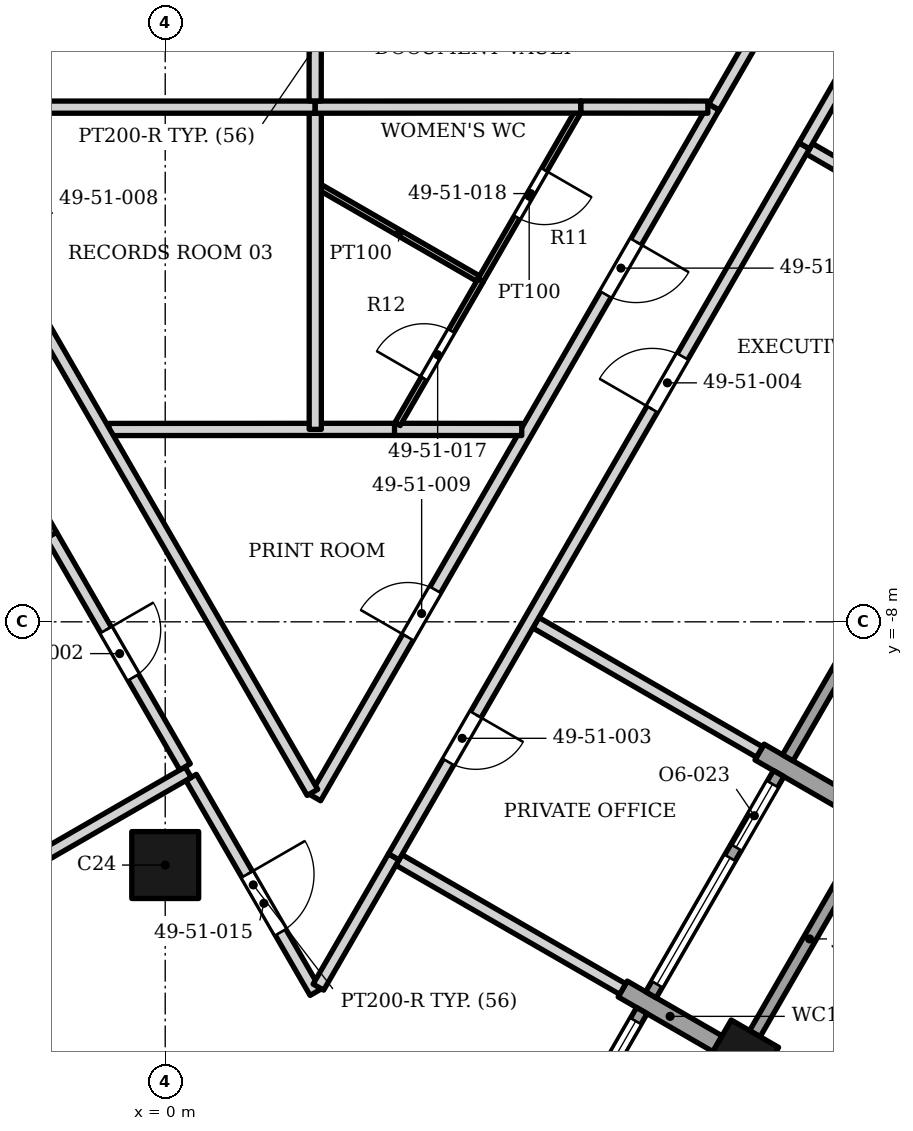
"""IFC4 building model, lengths in metres.
Left out: names, types, materials, properties, quantities, classifications, styles, units other than length and angle.
Written with IfcOpenShell. Run it as: python <this file> out.ifc"""

import sys

from ifc_helpers import new_model, si_unit, direction, frame, frame_2d, origin, origin_2d, place, context, subcontext, project, spatial, rectangle, extrude, element, fill, save


model = new_model("IFC4")
c1 = context("Model", 3, precision=1e-05, world=origin(), true_north=direction((0.0, 1.0)))
c2 = subcontext(c1, "Body", "Model", "MODEL_VIEW")
j1 = project(units=[si_unit("LENGTHUNIT", "METRE"), si_unit("PLANEANGLEUNIT", "RADIAN")], contexts=[c1])
p1 = place(None, origin())
s1 = spatial("IfcSite", under=j1, at=p1, CompositionType="ELEMENT")
p2 = place(p1, origin())
s2 = spatial("IfcBuilding", under=s1, at=p2, CompositionType="ELEMENT")
p3 = place(p2, frame((0.0, 0.0, 208.1)))
s3 = spatial("IfcBuildingStorey", under=s2, at=p3, CompositionType="ELEMENT", Elevation=208.1)
p4 = place(p3, frame((0.0, -12.0, 0.0), z_axis=(0.0, 0.0, 1.0), x_axis=(1.0, 0.0, 0.0)))
e1 = element("IfcColumn", 1, at=p4, inside=s3, PredefinedType="COLUMN", context=c2, shape_type="SweptSolid", body=[
    extrude(rectangle(XDim=1.1, YDim=1.1, at=origin_2d()), origin(), (0.0, 0.0, 1.0), 3.9),
])
p5 = place(p3, frame((9.473, -15.163, 0.0), z_axis=(0.0, 0.0, 1.0), x_axis=(0.5, 0.866025403784, 0.0)))
e2 = element("IfcColumn", 2, at=p5, inside=s3, PredefinedType="COLUMN", context=c2, shape_type="SweptSolid", body=[
    extrude(rectangle(XDim=0.9, YDim=0.9, at=origin_2d()), origin(), (0.0, 0.0, 1.0), 3.9),
])
for number, where, z_axis, x_axis in (
    (3, (9.083, -14.938, 0.0), (0.0, 0.0, 1.0), (-0.866, 0.5, 0.0)),
    (4, (11.333, -11.041, 0.0), (0.0, 0.0, 1.0), (-0.866, 0.5, 0.0)),
):
    element("IfcWall", number, at=place(p3, frame(where, z_axis=z_axis, x_axis=x_axis)), inside=s3, PredefinedType="SOLIDWALL", context=c2, shape_type="SweptSolid", body=[
        extrude(rectangle(XDim=1.8, YDim=0.3, at=frame_2d((0.9, 0.0))), origin(), (0.0, 0.0, 1.0), 3.0),
    ])
p6 = place(p3, frame((5.739, -18.031, 0.0), z_axis=(0.0, 0.0, 1.0), x_axis=(0.500002543286, 0.866023935413, 0.0)))
e5 = element("IfcWall", 5, at=p6, inside=s3, PredefinedType="ELEMENTEDWALL", context=c2, shape_type="SweptSolid", body=[
    extrude(rectangle(XDim=4.2, YDim=0.2, at=frame_2d((2.1, 0.0))), origin(), (0.0, 0.0, 1.0), 3.0),
])
p7 = place(p6, frame((0.2, 0.0, 0.45)))
e6 = element("IfcOpeningElement", 6, at=p7, cuts=e5, PredefinedType="OPENING", context=c2, shape_type="SweptSolid", body=[
    extrude(rectangle(XDim=3.8, YDim=2.25, at=frame_2d((1.9, 1.125))), frame((0.0, 0.11, 0.0), z_axis=(0.0, -1.0, 0.0), x_axis=(1.0, 0.0, 0.0)), (0.0, 0.0, 1.0), 0.22),
])
p8 = place(p3, frame((9.698, -14.773, 0.0), z_axis=(0.0, 0.0, 1.0), x_axis=(0.500012057535, 0.866018442252, 0.0)))
e7 = element("IfcWall", 7, at=p8, inside=s3, PredefinedType="SOLIDWALL", context=c2, shape_type="SweptSolid", body=[
    extrude(rectangle(XDim=3.6, YDim=0.2, at=frame_2d((1.8, 0.0))), origin(), (0.0, 0.0, 1.0), 2.95),
])
p9 = place(p3, frame((7.989, -14.133, 0.0), z_axis=(0.0, 0.0, 1.0), x_axis=(0.500027713859, 0.866009402589, 0.0)))
e8 = element("IfcWall", 8, at=p9, inside=s3, PredefinedType="ELEMENTEDWALL", context=c2, shape_type="SweptSolid", body=[
    extrude(rectangle(XDim=4.2, YDim=0.2, at=frame_2d((2.1, 0.0))), origin(), (0.0, 0.0, 1.0), 2.95),
])
p10 = place(p9, frame((0.2, 0.0, 0.45)))
e9 = element("IfcOpeningElement", 9, at=p10, cuts=e8, PredefinedType="OPENING", context=c2, shape_type="SweptSolid", body=[
    extrude(rectangle(XDim=2.4, YDim=2.25, at=frame_2d((1.2, 1.125))), frame((0.0, 0.11, 0.0), z_axis=(0.0, -1.0, 0.0), x_axis=(1.0, 0.0, 0.0)), (0.0, 0.0, 1.0), 0.22),
])
p11 = place(p9, frame((2.8, 0.0, 0.0)))
e10 = element("IfcOpeningElement", 10, at=p11, cuts=e8, PredefinedType="OPENING", context=c2, shape_type="SweptSolid", body=[
    extrude(rectangle(XDim=1.2, YDim=2.7, at=frame_2d((0.6, 1.35))), frame((0.0, 0.11, 0.0), z_axis=(0.0, -1.0, 0.0), x_axis=(1.0, 0.0, 0.0)), (0.0, 0.0, 1.0), 0.22),
])
p12 = place(p3, frame((10.239, -10.236, 0.0), z_axis=(0.0, 0.0, 1.0), x_axis=(0.500002543286, 0.866023935413, 0.0)))
e11 = element("IfcWall", 11, at=p12, inside=s3, PredefinedType="ELEMENTEDWALL", context=c2, shape_type="SweptSolid", body=[
    extrude(rectangle(XDim=4.2, YDim=0.2, at=frame_2d((2.1, 0.0))), origin(), (0.0, 0.0, 1.0), 3.0),
])
p13 = place(p3, frame((0.426, -10.558, 0.0), z_axis=(0.0, 0.0, 1.0), x_axis=(0.500350308999, -0.865823058301, 0.0)))
e12 = element("IfcWall", 12, at=p13, inside=s3, PredefinedType="PARTITIONING", context=c2, shape_type="SweptSolid", body=[
    extrude(rectangle(XDim=4.083, YDim=0.2, at=frame_2d((2.042, 0.0))), origin(), (0.0, 0.0, 1.0), 2.95),
])
p14 = place(p13, frame((1.842, 0.0, 0.0)))
e13 = element("IfcOpeningElement", 13, at=p14, cuts=e12, PredefinedType="OPENING", context=c2, shape_type="SweptSolid", body=[
    extrude(rectangle(XDim=1.1, YDim=2.1, at=frame_2d((0.55, 1.05))), frame((0.0, 0.11, 0.0), z_axis=(0.0, -1.0, 0.0), x_axis=(1.0, 0.0, 0.0)), (0.0, 0.0, 1.0), 0.22),
])
p15 = place(p3, frame((3.843, -11.915, 0.0), z_axis=(0.0, 0.0, 1.0), x_axis=(0.866177933903, -0.499735716973, 0.0)))
e14 = element("IfcWall", 14, at=p15, inside=s3, PredefinedType="PARTITIONING", context=c2, shape_type="SweptSolid", body=[
    extrude(rectangle(XDim=4.249, YDim=0.2, at=frame_2d((2.125, 0.0))), origin(), (0.0, 0.0, 1.0), 2.95),
])
p16 = place(p3, frame((2.519, -14.007, 0.0), z_axis=(0.0, 0.0, 1.0), x_axis=(0.500678517204, 0.865633307128, 0.0)))
e15 = element("IfcWall", 15, at=p16, inside=s3, PredefinedType="PARTITIONING", context=c2, shape_type="SweptSolid", body=[
    extrude(rectangle(XDim=2.475, YDim=0.2, at=frame_2d((1.238, 0.0))), origin(), (0.0, 0.0, 1.0), 2.95),
])
p17 = place(p3, frame((2.469, -10.893, 0.0), z_axis=(0.0, 0.0, 1.0), x_axis=(0.499769731946, 0.866158308296, 0.0)))
e16 = element("IfcWall", 16, at=p17, inside=s3, PredefinedType="PARTITIONING", context=c2, shape_type="SweptSolid", body=[
    extrude(rectangle(XDim=13.113, YDim=0.2, at=frame_2d((6.557, 0.0))), origin(), (0.0, 0.0, 1.0), 2.884),
])
p18 = place(p17, frame((3.048, 0.0, 0.0)))
e17 = element("IfcOpeningElement", 17, at=p18, cuts=e16, PredefinedType="OPENING", context=c2, shape_type="SweptSolid", body=[
    extrude(rectangle(XDim=0.9, YDim=2.1, at=frame_2d((0.45, 1.05))), frame((0.0, 0.11, 0.0), z_axis=(0.0, -1.0, 0.0), x_axis=(1.0, 0.0, 0.0)), (0.0, 0.0, 1.0), 0.22),
])
p19 = place(p17, frame((9.556, 0.0, 0.0)))
e18 = element("IfcOpeningElement", 18, at=p19, cuts=e16, PredefinedType="OPENING", context=c2, shape_type="SweptSolid", body=[
    extrude(rectangle(XDim=1.0, YDim=2.1, at=frame_2d((0.5, 1.05))), frame((0.0, 0.11, 0.0), z_axis=(0.0, -1.0, 0.0), x_axis=(1.0, 0.0, 0.0)), (0.0, 0.0, 1.0), 0.22),
])
p20 = place(p3, frame((-5.641, -13.946, 0.0), z_axis=(0.0, 0.0, 1.0), x_axis=(0.866131772529, 0.499815718657, 0.0)))
e19 = element("IfcWall", 19, at=p20, inside=s3, PredefinedType="PARTITIONING", context=c2, shape_type="SweptSolid", body=[
    extrude(rectangle(XDim=6.949, YDim=0.2, at=frame_2d((3.475, 0.0))), origin(), (0.0, 0.0, 1.0), 2.884),
])
p21 = place(p3, frame((-1.873, -6.576, 0.0), z_axis=(0.0, 0.0, 1.0), x_axis=(0.499989943423, -0.866031209874, 0.0)))
e20 = element("IfcWall", 20, at=p21, inside=s3, PredefinedType="PARTITIONING", context=c2, shape_type="SweptSolid", body=[
    extrude(rectangle(XDim=4.398, YDim=0.2, at=frame_2d((2.199, 0.0))), origin(), (0.0, 0.0, 1.0), 2.884),
])
p22 = place(p21, frame((1.798, 0.0, 0.0)))
e21 = element("IfcOpeningElement", 21, at=p22, cuts=e20, PredefinedType="OPENING", context=c2, shape_type="SweptSolid", body=[
    extrude(rectangle(XDim=0.9, YDim=2.1, at=frame_2d((0.45, 1.05))), frame((0.0, 0.11, 0.0), z_axis=(0.0, -1.0, 0.0), x_axis=(1.0, 0.0, 0.0)), (0.0, 0.0, 1.0), 0.22),
])
p23 = place(p3, frame((6.094, -8.014, 0.0), z_axis=(0.0, 0.0, 1.0), x_axis=(0.865797051121, -0.50039531, 0.0)))
e22 = element("IfcWall", 22, at=p23, inside=s3, PredefinedType="PARTITIONING", context=c2, shape_type="SweptSolid", body=[
    extrude(rectangle(XDim=4.25, YDim=0.2, at=frame_2d((2.125, 0.0))), origin(), (0.0, 0.0, 1.0), 3.052),
])
p24 = place(p3, frame((-6.374, 1.22, 0.0), z_axis=(0.0, 0.0, 1.0), x_axis=(0.5000018851, -0.866024315419, 0.0)))
e23 = element("IfcWall", 23, at=p24, inside=s3, PredefinedType="PARTITIONING", context=c2, shape_type="SweptSolid", body=[
    extrude(rectangle(XDim=9.0, YDim=0.2, at=frame_2d((4.5, 0.0))), origin(), (0.0, 0.0, 1.0), 2.884),
])
p25 = place(p24, frame((4.0, 0.0, 0.0)))
e24 = element("IfcOpeningElement", 24, at=p25, cuts=e23, PredefinedType="OPENING", context=c2, shape_type="SweptSolid", body=[
    extrude(rectangle(XDim=1.0, YDim=2.4, at=frame_2d((0.5, 1.2))), frame((0.0, 0.11, 0.0), z_axis=(0.0, -1.0, 0.0), x_axis=(1.0, 0.0, 0.0)), (0.0, 0.0, 1.0), 0.22),
])
p26 = place(p3, frame((-0.925, -4.837, 0.0), z_axis=(0.0, 0.0, 1.0), x_axis=(0.999999933905, 0.000363579678, 0.0)))
e25 = element("IfcWall", 25, at=p26, inside=s3, PredefinedType="PARTITIONING", context=c2, shape_type="SweptSolid", body=[
    extrude(rectangle(XDim=4.7, YDim=0.2, at=frame_2d((2.35, 0.0))), origin(), (0.0, 0.0, 1.0), 3.73),
])
p27 = place(p3, frame((3.771, -4.835, 0.0), z_axis=(0.0, 0.0, 1.0), x_axis=(0.999999666495, -0.00081670723, 0.0)))
e26 = element("IfcWall", 26, at=p27, inside=s3, PredefinedType="PARTITIONING", context=c2, shape_type="SweptSolid", body=[
    extrude(rectangle(XDim=2.093, YDim=0.2, at=frame_2d((1.046, 0.0))), origin(), (0.0, 0.0, 1.0), 3.73),
])
p28 = place(p3, frame((3.821, -4.748, 0.0), z_axis=(0.0, 0.0, 1.0), x_axis=(0.500518638442, 0.865725760603, 0.0)))
e27 = element("IfcWall", 27, at=p28, inside=s3, PredefinedType="PARTITIONING", context=c2, shape_type="SweptSolid", body=[
    extrude(rectangle(XDim=2.733, YDim=0.1, at=frame_2d((1.367, 0.0))), origin(), (0.0, 0.0, 1.0), 2.884),
])
p29 = place(p28, frame((0.867, 0.0, 0.0)))
e28 = element("IfcOpeningElement", 28, at=p29, cuts=e27, PredefinedType="OPENING", context=c2, shape_type="SweptSolid", body=[
    extrude(rectangle(XDim=0.9, YDim=2.1, at=frame_2d((0.45, 1.05))), frame((0.0, 0.06, 0.0), z_axis=(0.0, -1.0, 0.0), x_axis=(1.0, 0.0, 0.0)), (0.0, 0.0, 1.0), 0.12),
])
p30 = place(p3, frame((5.189, -2.379, 0.0), z_axis=(0.0, 0.0, 1.0), x_axis=(0.500398861512, 0.865794998482, 0.0)))
e29 = element("IfcWall", 29, at=p30, inside=s3, PredefinedType="PARTITIONING", context=c2, shape_type="SweptSolid", body=[
    extrude(rectangle(XDim=3.187, YDim=0.1, at=frame_2d((1.593, 0.0))), origin(), (0.0, 0.0, 1.0), 3.73),
])
p31 = place(p30, frame((1.192, 0.0, 0.0)))
e30 = element("IfcOpeningElement", 30, at=p31, cuts=e29, PredefinedType="OPENING", context=c2, shape_type="SweptSolid", body=[
    extrude(rectangle(XDim=0.9, YDim=2.1, at=frame_2d((0.45, 1.05))), frame((0.0, 0.06, 0.0), z_axis=(0.0, -1.0, 0.0), x_axis=(1.0, 0.0, 0.0)), (0.0, 0.0, 1.0), 0.12),
])
p32 = place(p3, frame((2.552, -0.858, 0.0), z_axis=(0.0, 0.0, 1.0), x_axis=(0.866076950936, -0.499910707084, 0.0)))
e31 = element("IfcWall", 31, at=p32, inside=s3, PredefinedType="PARTITIONING", context=c2, shape_type="SweptSolid", body=[
    extrude(rectangle(XDim=2.994, YDim=0.1, at=frame_2d((1.497, 0.0))), origin(), (0.0, 0.0, 1.0), 2.884),
])
p33 = place(p3, frame((10.596, -0.221, 0.0), z_axis=(0.0, 0.0, 1.0), x_axis=(0.86582081126, -0.500354197333, 0.0)))
e32 = element("IfcWall", 32, at=p33, inside=s3, PredefinedType="PARTITIONING", context=c2, shape_type="SweptSolid", body=[
    extrude(rectangle(XDim=4.248, YDim=0.2, at=frame_2d((2.124, 0.0))), origin(), (0.0, 0.0, 1.0), 3.052),
])
p34 = place(p3, frame((3.759, -11.864, 0.0), z_axis=(0.0, 0.0, 1.0), x_axis=(0.499997969693, 0.866026575979, 0.0)))
e33 = element("IfcWall", 33, at=p34, inside=s3, PredefinedType="PARTITIONING", context=c2, shape_type="SweptSolid", body=[
    extrude(rectangle(XDim=13.5, YDim=0.2, at=frame_2d((6.75, 0.0))), origin(), (0.0, 0.0, 1.0), 2.884),
])
p35 = place(p34, frame((1.8, 0.0, 0.0)))
e34 = element("IfcOpeningElement", 34, at=p35, cuts=e33, PredefinedType="OPENING", context=c2, shape_type="SweptSolid", body=[
    extrude(rectangle(XDim=0.9, YDim=2.1, at=frame_2d((0.45, 1.05))), frame((0.0, 0.11, 0.0), z_axis=(0.0, -1.0, 0.0), x_axis=(1.0, 0.0, 0.0)), (0.0, 0.0, 1.0), 0.22),
])
p36 = place(p34, frame((8.5, 0.0, 0.0)))
e35 = element("IfcOpeningElement", 35, at=p36, cuts=e33, PredefinedType="OPENING", context=c2, shape_type="SweptSolid", body=[
    extrude(rectangle(XDim=1.0, YDim=2.4, at=frame_2d((0.5, 1.2))), frame((0.0, 0.11, 0.0), z_axis=(0.0, -1.0, 0.0), x_axis=(1.0, 0.0, 0.0)), (0.0, 0.0, 1.0), 0.22),
])
p37 = place(p3, frame((2.468, -4.835, 0.0), z_axis=(0.0, 0.0, 1.0), x_axis=(0.0, 1.0, 0.0)))
e36 = element("IfcWall", 36, at=p37, inside=s3, PredefinedType="PARTITIONING", context=c2, shape_type="SweptSolid", body=[
    extrude(rectangle(XDim=5.199, YDim=0.2, at=frame_2d((2.6, 0.0))), origin(), (0.0, 0.0, 1.0), 3.73),
])
p38 = place(p3, frame((-4.086, 0.464, 0.0), z_axis=(0.0, 0.0, 1.0), x_axis=(0.499999074482, -0.866025938132, 0.0)))
e37 = element("IfcWall", 37, at=p38, inside=s3, PredefinedType="PARTITIONING", context=c2, shape_type="SweptSolid", body=[
    extrude(rectangle(XDim=13.013, YDim=0.2, at=frame_2d((6.507, 0.0))), origin(), (0.0, 0.0, 1.0), 2.884),
])
p39 = place(p38, frame((2.607, 0.0, 0.0)))
e38 = element("IfcOpeningElement", 38, at=p39, cuts=e37, PredefinedType="OPENING", context=c2, shape_type="SweptSolid", body=[
    extrude(rectangle(XDim=0.9, YDim=2.1, at=frame_2d((0.45, 1.05))), frame((0.0, 0.11, 0.0), z_axis=(0.0, -1.0, 0.0), x_axis=(1.0, 0.0, 0.0)), (0.0, 0.0, 1.0), 0.22),
])
p40 = place(p3, frame((-3.986, 0.464, 0.0), z_axis=(0.0, 0.0, 1.0), x_axis=(1.0, 0.0, 0.0)))
e39 = element("IfcWall", 39, at=p40, inside=s3, PredefinedType="PARTITIONING", context=c2, shape_type="SweptSolid", body=[
    extrude(rectangle(XDim=6.452, YDim=0.2, at=frame_2d((3.226, 0.0))), origin(), (0.0, 0.0, 1.0), 2.884),
])
p41 = place(p3, frame((6.833, 0.466, 0.0), z_axis=(0.0, 0.0, 1.0), x_axis=(0.999999665949, -0.000817374785, 0.0)))
e40 = element("IfcWall", 40, at=p41, inside=s3, PredefinedType="PARTITIONING", context=c2, shape_type="SweptSolid", body=[
    extrude(rectangle(XDim=2.091, YDim=0.2, at=frame_2d((1.045, 0.0))), origin(), (0.0, 0.0, 1.0), 3.73),
])
p42 = place(p3, frame((2.468, 0.464, 0.0), z_axis=(0.0, 0.0, 1.0), x_axis=(0.999999923373, 0.000391476957, 0.0)))
e41 = element("IfcWall", 41, at=p42, inside=s3, PredefinedType="PARTITIONING", context=c2, shape_type="SweptSolid", body=[
    extrude(rectangle(XDim=4.365, YDim=0.2, at=frame_2d((2.183, 0.0))), origin(), (0.0, 0.0, 1.0), 3.73),
])
p43 = place(p3, frame((9.025, 0.466, 0.0), z_axis=(0.0, 0.0, 1.0), x_axis=(0.500421935149, 0.865781662327, 0.0)))
e42 = element("IfcWall", 42, at=p43, inside=s3, PredefinedType="PARTITIONING", context=c2, shape_type="SweptSolid", body=[
    extrude(rectangle(XDim=3.635, YDim=0.2, at=frame_2d((1.817, 0.0))), origin(), (0.0, 0.0, 1.0), 3.052),
])
p44 = place(p3, frame((2.466, 0.566, 0.0), z_axis=(0.0, 0.0, 1.0), x_axis=(0.000820793157, 0.999999663149, 0.0)))
e43 = element("IfcWall", 43, at=p44, inside=s3, PredefinedType="PARTITIONING", context=c2, shape_type="SweptSolid", body=[
    extrude(rectangle(XDim=1.785, YDim=0.2, at=frame_2d((0.892, 0.0))), origin(), (0.0, 0.0, 1.0), 3.73),
])
p45 = place(p3, frame((10.51, -0.171, 0.0), z_axis=(0.0, 0.0, 1.0), x_axis=(0.499676732976, 0.86621196166, 0.0)))
e44 = element("IfcWall", 44, at=p45, inside=s3, PredefinedType="PARTITIONING", context=c2, shape_type="SweptSolid", body=[
    extrude(rectangle(XDim=4.469, YDim=0.2, at=frame_2d((2.234, 0.0))), origin(), (0.0, 0.0, 1.0), 3.73),
])
p46 = place(p45, frame((1.783, 0.0, 0.0)))
e45 = element("IfcOpeningElement", 45, at=p46, cuts=e44, PredefinedType="OPENING", context=c2, shape_type="SweptSolid", body=[
    extrude(rectangle(XDim=0.9, YDim=2.1, at=frame_2d((0.45, 1.05))), frame((0.0, 0.11, 0.0), z_axis=(0.0, -1.0, 0.0), x_axis=(1.0, 0.0, 0.0)), (0.0, 0.0, 1.0), 0.22),
])
p47 = place(p7, origin())
e46 = element("IfcWindow", 46, at=p47, inside=s3, PartitioningType="SINGLE_PANEL", PredefinedType="WINDOW", context=c2, shape_type="SweptSolid", body=[
    extrude(rectangle(XDim=3.8, YDim=2.25, at=frame_2d((1.9, 1.125))), frame((0.0, 0.03, 0.0), z_axis=(0.0, -1.0, 0.0), x_axis=(1.0, 0.0, 0.0)), (0.0, 0.0, 1.0), 0.06),
])
fill(e6, e46)
p48 = place(p10, origin())
e47 = element("IfcWindow", 47, at=p48, inside=s3, PartitioningType="SINGLE_PANEL", PredefinedType="WINDOW", context=c2, shape_type="SweptSolid", body=[
    extrude(rectangle(XDim=2.4, YDim=2.25, at=frame_2d((1.2, 1.125))), frame((0.0, 0.03, 0.0), z_axis=(0.0, -1.0, 0.0), x_axis=(1.0, 0.0, 0.0)), (0.0, 0.0, 1.0), 0.06),
])
fill(e9, e47)
p49 = place(p11, origin())
e48 = element("IfcDoor", 48, at=p49, inside=s3, OperationType="SINGLE_SWING_LEFT", PredefinedType="DOOR", context=c2, shape_type="SweptSolid", body=[
    extrude(rectangle(XDim=1.2, YDim=2.7, at=frame_2d((0.6, 1.35))), frame((0.0, 0.025, 0.0), z_axis=(0.0, -1.0, 0.0), x_axis=(1.0, 0.0, 0.0)), (0.0, 0.0, 1.0), 0.05),
])
fill(e10, e48)
p50 = place(p22, origin())
e49 = element("IfcDoor", 49, at=p50, inside=s3, OperationType="SINGLE_SWING_LEFT", PredefinedType="DOOR", context=c2, shape_type="SweptSolid", body=[
    extrude(rectangle(XDim=0.9, YDim=2.1, at=frame_2d((0.45, 1.05))), frame((0.0, 0.025, 0.0), z_axis=(0.0, -1.0, 0.0), x_axis=(1.0, 0.0, 0.0)), (0.0, 0.0, 1.0), 0.05),
])
fill(e21, e49)
p51 = place(p35, origin())
e50 = element("IfcDoor", 50, at=p51, inside=s3, OperationType="SINGLE_SWING_RIGHT", PredefinedType="DOOR", context=c2, shape_type="SweptSolid", body=[
    extrude(rectangle(XDim=0.9, YDim=2.1, at=frame_2d((0.45, 1.05))), frame((0.0, 0.025, 0.0), z_axis=(0.0, -1.0, 0.0), x_axis=(1.0, 0.0, 0.0)), (0.0, 0.0, 1.0), 0.05),
])
fill(e34, e50)
p52 = place(p36, origin())
e51 = element("IfcDoor", 51, at=p52, inside=s3, OperationType="SINGLE_SWING_LEFT", PredefinedType="DOOR", context=c2, shape_type="SweptSolid", body=[
    extrude(rectangle(XDim=1.0, YDim=2.4, at=frame_2d((0.5, 1.2))), frame((0.0, 0.025, 0.0), z_axis=(0.0, -1.0, 0.0), x_axis=(1.0, 0.0, 0.0)), (0.0, 0.0, 1.0), 0.05),
])
fill(e35, e51)
p53 = place(p18, origin())
e52 = element("IfcDoor", 52, at=p53, inside=s3, OperationType="SINGLE_SWING_LEFT", PredefinedType="DOOR", context=c2, shape_type="SweptSolid", body=[
    extrude(rectangle(XDim=0.9, YDim=2.1, at=frame_2d((0.45, 1.05))), frame((0.0, 0.025, 0.0), z_axis=(0.0, -1.0, 0.0), x_axis=(1.0, 0.0, 0.0)), (0.0, 0.0, 1.0), 0.05),
])
fill(e17, e52)
p54 = place(p14, origin())
e53 = element("IfcDoor", 53, at=p54, inside=s3, OperationType="SINGLE_SWING_LEFT", PredefinedType="DOOR", context=c2, shape_type="SweptSolid", body=[
    extrude(rectangle(XDim=1.1, YDim=2.1, at=frame_2d((0.55, 1.05))), frame((0.0, 0.025, 0.0), z_axis=(0.0, -1.0, 0.0), x_axis=(1.0, 0.0, 0.0)), (0.0, 0.0, 1.0), 0.05),
])
fill(e13, e53)
p55 = place(p19, origin())
e54 = element("IfcDoor", 54, at=p55, inside=s3, OperationType="SINGLE_SWING_RIGHT", PredefinedType="DOOR", context=c2, shape_type="SweptSolid", body=[
    extrude(rectangle(XDim=1.0, YDim=2.1, at=frame_2d((0.5, 1.05))), frame((0.0, 0.025, 0.0), z_axis=(0.0, -1.0, 0.0), x_axis=(1.0, 0.0, 0.0)), (0.0, 0.0, 1.0), 0.05),
])
fill(e18, e54)
p56 = place(p29, origin())
e55 = element("IfcDoor", 55, at=p56, inside=s3, OperationType="SINGLE_SWING_LEFT", PredefinedType="DOOR", context=c2, shape_type="SweptSolid", body=[
    extrude(rectangle(XDim=0.9, YDim=2.1, at=frame_2d((0.45, 1.05))), frame((0.0, 0.025, 0.0), z_axis=(0.0, -1.0, 0.0), x_axis=(1.0, 0.0, 0.0)), (0.0, 0.0, 1.0), 0.05),
])
fill(e28, e55)
p57 = place(p31, origin())
e56 = element("IfcDoor", 56, at=p57, inside=s3, OperationType="SINGLE_SWING_RIGHT", PredefinedType="DOOR", context=c2, shape_type="SweptSolid", body=[
    extrude(rectangle(XDim=0.9, YDim=2.1, at=frame_2d((0.45, 1.05))), frame((0.0, 0.025, 0.0), z_axis=(0.0, -1.0, 0.0), x_axis=(1.0, 0.0, 0.0)), (0.0, 0.0, 1.0), 0.05),
])
fill(e30, e56)
save(model, sys.argv[1])
